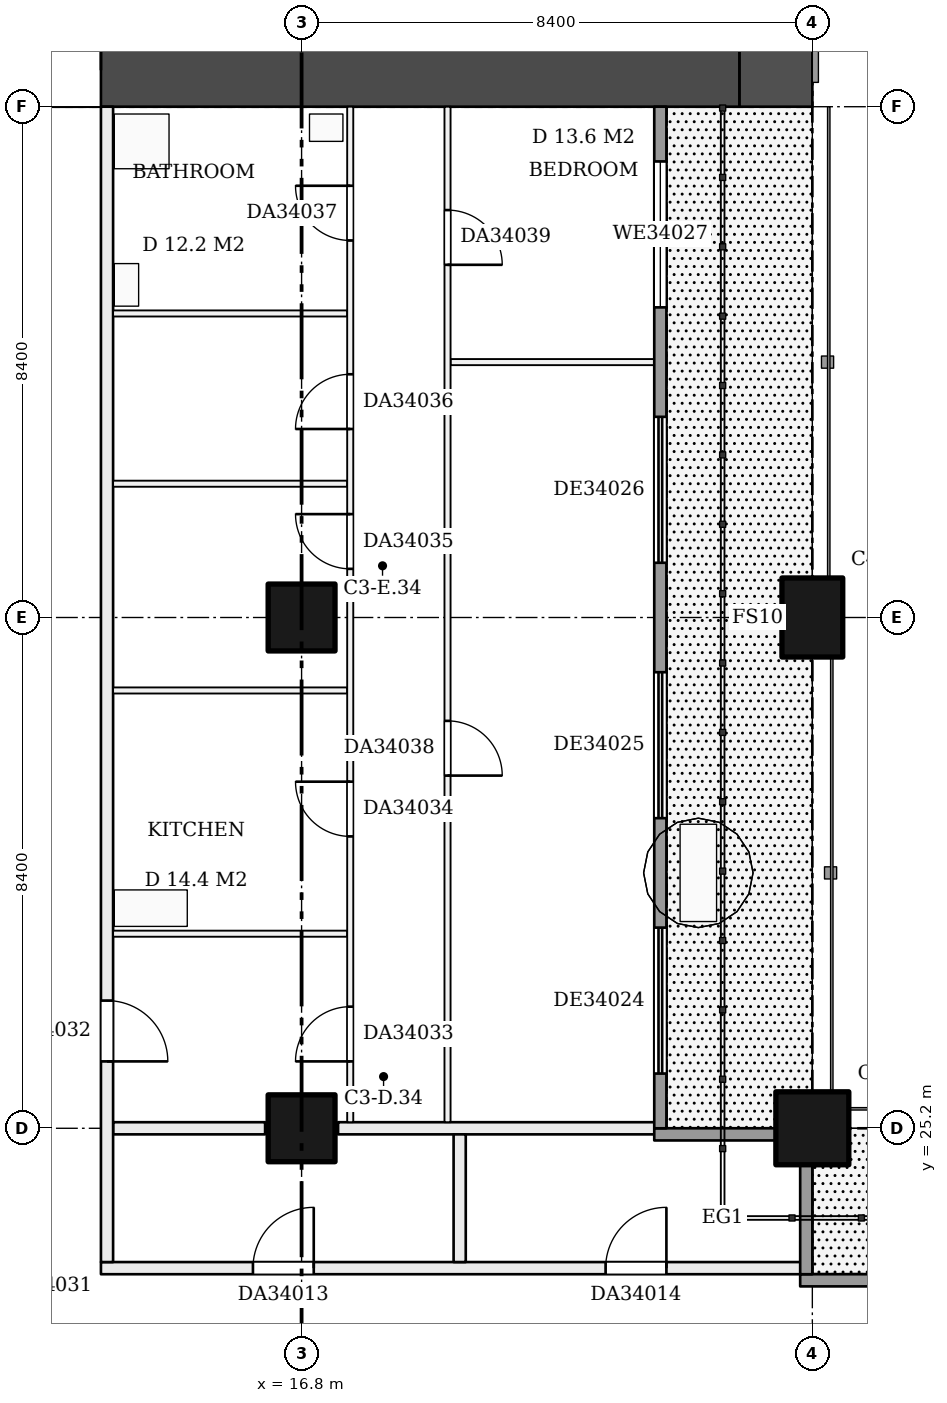
"""IFC4 building model, lengths in metres.
Left out: names, types, materials, properties, quantities, classifications, styles, units other than length and angle.
Written with IfcOpenShell. Run it as: python <this file> out.ifc"""

import sys

from ifc_helpers import new_model, si_unit, direction, frame, frame_2d, origin, origin_2d, place, context, subcontext, project, spatial, rectangle, extrude, element, fill, save


model = new_model("IFC4")
c1 = context("Model", 3, precision=1e-05, world=origin(), true_north=direction((0.0, 1.0)))
c2 = subcontext(c1, "Body", "Model", "MODEL_VIEW")
j1 = project(units=[si_unit("LENGTHUNIT", "METRE"), si_unit("PLANEANGLEUNIT", "RADIAN")], contexts=[c1])
p1 = place(None, origin())
s1 = spatial("IfcSite", under=j1, at=p1, CompositionType="ELEMENT")
p2 = place(p1, origin())
s2 = spatial("IfcBuilding", under=s1, at=p2, CompositionType="ELEMENT")
p3 = place(p2, frame((0.0, 0.0, 133.7)))
s3 = spatial("IfcBuildingStorey", under=s2, at=p3, CompositionType="ELEMENT", Elevation=133.7)
for number, where, z_axis, x_axis in (
    (1, (16.8, 25.2, 0.0), (0.0, 0.0, 1.0), (1.0, 0.0, 0.0)),
    (2, (16.8, 33.6, 0.0), (0.0, 0.0, 1.0), (1.0, 0.0, 0.0)),
):
    element("IfcColumn", number, at=place(p3, frame(where, z_axis=z_axis, x_axis=x_axis)), inside=s3, PredefinedType="COLUMN", context=c2, shape_type="SweptSolid", body=[
        extrude(rectangle(XDim=1.1, YDim=1.1, at=origin_2d()), origin(), (0.0, 0.0, 1.0), 3.22),
    ])
p4 = place(p3, frame((25.2, 25.2, 0.0), z_axis=(0.0, 0.0, 1.0), x_axis=(1.0, 0.0, 0.0)))
e3 = element("IfcColumn", 3, at=p4, inside=s3, PredefinedType="COLUMN", context=c2, shape_type="SweptSolid", body=[
    extrude(rectangle(XDim=1.2, YDim=1.2, at=origin_2d()), origin(), (0.0, 0.0, 1.0), 3.22),
])
p5 = place(p3, frame((25.2, 33.6, 0.0), z_axis=(0.0, 0.0, 1.0), x_axis=(0.0, 1.0, 0.0)))
e4 = element("IfcColumn", 4, at=p5, inside=s3, PredefinedType="COLUMN", context=c2, shape_type="SweptSolid", body=[
    extrude(rectangle(XDim=1.3, YDim=1.0, at=origin_2d()), origin(), (0.0, 0.0, 1.0), 3.22),
])
p6 = place(p3, frame((24.6, 58.8, 0.0), z_axis=(0.0, 0.0, 1.0), x_axis=(0.0, -1.0, 0.0)))
e5 = element("IfcWall", 5, at=p6, inside=s3, PredefinedType="SHEAR", context=c2, shape_type="SweptSolid", body=[
    extrude(rectangle(XDim=16.8, YDim=1.2, at=frame_2d((8.4, 0.0))), origin(), (0.0, 0.0, 1.0), 3.22),
])
p7 = place(p6, frame((1.8, 0.0, 0.5)))
e6 = element("IfcOpeningElement", 6, at=p7, cuts=e5, PredefinedType="OPENING", context=c2, shape_type="SweptSolid", body=[
    extrude(rectangle(XDim=1.8, YDim=2.4, at=frame_2d((0.9, 1.2))), frame((0.0, 0.61, 0.0), z_axis=(0.0, -1.0, 0.0), x_axis=(1.0, 0.0, 0.0)), (0.0, 0.0, 1.0), 1.22),
])
p8 = place(p6, frame((4.644, 0.0, 1.6)))
e7 = element("IfcOpeningElement", 7, at=p8, cuts=e5, PredefinedType="OPENING", context=c2, shape_type="SweptSolid", body=[
    extrude(rectangle(XDim=1.2, YDim=1.2, at=frame_2d((0.6, 0.6))), frame((0.0, 0.61, 0.0), z_axis=(0.0, -1.0, 0.0), x_axis=(1.0, 0.0, 0.0)), (0.0, 0.0, 1.0), 1.22),
])
p9 = place(p6, frame((6.45, 0.0, 1.6)))
e8 = element("IfcOpeningElement", 8, at=p9, cuts=e5, PredefinedType="OPENING", context=c2, shape_type="SweptSolid", body=[
    extrude(rectangle(XDim=1.8, YDim=1.2, at=frame_2d((0.9, 0.6))), frame((0.0, 0.61, 0.0), z_axis=(0.0, -1.0, 0.0), x_axis=(1.0, 0.0, 0.0)), (0.0, 0.0, 1.0), 1.22),
])
p10 = place(p6, frame((12.65, 0.0, 0.6)))
e9 = element("IfcOpeningElement", 9, at=p10, cuts=e5, PredefinedType="OPENING", context=c2, shape_type="SweptSolid", body=[
    extrude(rectangle(XDim=1.0, YDim=2.1, at=frame_2d((0.5, 1.05))), frame((0.0, 0.61, 0.0), z_axis=(0.0, -1.0, 0.0), x_axis=(1.0, 0.0, 0.0)), (0.0, 0.0, 1.0), 1.22),
])
p11 = place(p6, frame((14.175, 0.0, 1.6)))
e10 = element("IfcOpeningElement", 10, at=p11, cuts=e5, PredefinedType="OPENING", context=c2, shape_type="SweptSolid", body=[
    extrude(rectangle(XDim=1.2, YDim=1.2, at=frame_2d((0.6, 0.6))), frame((0.0, 0.61, 0.0), z_axis=(0.0, -1.0, 0.0), x_axis=(1.0, 0.0, 0.0)), (0.0, 0.0, 1.0), 1.22),
])
p12 = place(p3, frame((9.6, 42.6, 0.0), z_axis=(0.0, 0.0, 1.0), x_axis=(1.0, 0.0, 0.0)))
e11 = element("IfcWall", 11, at=p12, inside=s3, PredefinedType="SHEAR", context=c2, shape_type="SweptSolid", body=[
    extrude(rectangle(XDim=14.4, YDim=1.2, at=frame_2d((7.2, 0.0))), origin(), (0.0, 0.0, 1.0), 3.22),
])
p13 = place(p12, frame((2.1, 0.0, 0.0)))
e12 = element("IfcOpeningElement", 12, at=p13, cuts=e11, PredefinedType="OPENING", context=c2, shape_type="SweptSolid", body=[
    extrude(rectangle(XDim=1.8, YDim=2.1, at=frame_2d((0.9, 1.05))), frame((0.0, 0.61, 0.0), z_axis=(0.0, -1.0, 0.0), x_axis=(1.0, 0.0, 0.0)), (0.0, 0.0, 1.0), 1.22),
])
p14 = place(p3, frame((13.5, 22.9, 0.0), z_axis=(0.0, 0.0, 1.0), x_axis=(1.0, 0.0, 0.0)))
e13 = element("IfcWall", 13, at=p14, inside=s3, PredefinedType="PARTITIONING", context=c2, shape_type="SweptSolid", body=[
    extrude(rectangle(XDim=11.6, YDim=0.2, at=frame_2d((5.8, 0.0))), origin(), (0.0, 0.0, 1.0), 3.22),
])
p15 = place(p14, frame((2.5, 0.0, 0.0)))
e14 = element("IfcOpeningElement", 14, at=p15, cuts=e13, PredefinedType="OPENING", context=c2, shape_type="SweptSolid", body=[
    extrude(rectangle(XDim=1.0, YDim=2.1, at=frame_2d((0.5, 1.05))), frame((0.0, 0.11, 0.0), z_axis=(0.0, -1.0, 0.0), x_axis=(1.0, 0.0, 0.0)), (0.0, 0.0, 1.0), 0.22),
])
p16 = place(p14, frame((8.3, 0.0, 0.0)))
e15 = element("IfcOpeningElement", 15, at=p16, cuts=e13, PredefinedType="OPENING", context=c2, shape_type="SweptSolid", body=[
    extrude(rectangle(XDim=1.0, YDim=2.1, at=frame_2d((0.5, 1.05))), frame((0.0, 0.11, 0.0), z_axis=(0.0, -1.0, 0.0), x_axis=(1.0, 0.0, 0.0)), (0.0, 0.0, 1.0), 0.22),
])
p17 = place(p3, frame((13.7, 25.2, 0.0), z_axis=(0.0, 0.0, 1.0), x_axis=(1.0, 0.0, 0.0)))
e16 = element("IfcWall", 16, at=p17, inside=s3, PredefinedType="PARTITIONING", context=c2, shape_type="SweptSolid", body=[
    extrude(rectangle(XDim=2.5, YDim=0.2, at=frame_2d((1.25, 0.0))), origin(), (0.0, 0.0, 1.0), 3.22),
])
p18 = place(p3, frame((17.4, 25.2, 0.0), z_axis=(0.0, 0.0, 1.0), x_axis=(1.0, 0.0, 0.0)))
e17 = element("IfcWall", 17, at=p18, inside=s3, PredefinedType="PARTITIONING", context=c2, shape_type="SweptSolid", body=[
    extrude(rectangle(XDim=5.3, YDim=0.2, at=frame_2d((2.65, 0.0))), origin(), (0.0, 0.0, 1.0), 3.22),
])
for number, where, z_axis, x_axis in (
    (18, (13.7, 28.4, 0.0), (0.0, 0.0, 1.0), (1.0, 0.0, 0.0)),
    (19, (13.7, 32.4, 0.0), (0.0, 0.0, 1.0), (1.0, 0.0, 0.0)),
    (20, (13.7, 35.8, 0.0), (0.0, 0.0, 1.0), (1.0, 0.0, 0.0)),
):
    element("IfcWall", number, at=place(p3, frame(where, z_axis=z_axis, x_axis=x_axis)), inside=s3, PredefinedType="PARTITIONING", context=c2, shape_type="SweptSolid", body=[
        extrude(rectangle(XDim=3.85, YDim=0.1, at=frame_2d((1.925, 0.0))), origin(), (0.0, 0.0, 1.0), 3.22),
    ])
p19 = place(p3, frame((19.25, 37.8, 0.0), z_axis=(0.0, 0.0, 1.0), x_axis=(1.0, 0.0, 0.0)))
e21 = element("IfcWall", 21, at=p19, inside=s3, PredefinedType="PARTITIONING", context=c2, shape_type="SweptSolid", body=[
    extrude(rectangle(XDim=3.45, YDim=0.1, at=frame_2d((1.725, 0.0))), origin(), (0.0, 0.0, 1.0), 3.22),
])
p20 = place(p3, frame((13.7, 38.6, 0.0), z_axis=(0.0, 0.0, 1.0), x_axis=(1.0, 0.0, 0.0)))
e22 = element("IfcWall", 22, at=p20, inside=s3, PredefinedType="PARTITIONING", context=c2, shape_type="SweptSolid", body=[
    extrude(rectangle(XDim=3.85, YDim=0.1, at=frame_2d((1.925, 0.0))), origin(), (0.0, 0.0, 1.0), 3.22),
])
p21 = place(p3, frame((13.6, 23.0, 0.0), z_axis=(0.0, 0.0, 1.0), x_axis=(0.0, 1.0, 0.0)))
e23 = element("IfcWall", 23, at=p21, inside=s3, PredefinedType="PARTITIONING", context=c2, shape_type="SweptSolid", body=[
    extrude(rectangle(XDim=19.0, YDim=0.2, at=frame_2d((9.5, 0.0))), origin(), (0.0, 0.0, 1.0), 3.22),
])
p22 = place(p21, frame((3.3, 0.0, 0.0)))
e24 = element("IfcOpeningElement", 24, at=p22, cuts=e23, PredefinedType="OPENING", context=c2, shape_type="SweptSolid", body=[
    extrude(rectangle(XDim=1.0, YDim=2.1, at=frame_2d((0.5, 1.05))), frame((0.0, 0.11, 0.0), z_axis=(0.0, -1.0, 0.0), x_axis=(1.0, 0.0, 0.0)), (0.0, 0.0, 1.0), 0.22),
])
p23 = place(p3, frame((17.6, 25.3, 0.0), z_axis=(0.0, 0.0, 1.0), x_axis=(0.0, 1.0, 0.0)))
e25 = element("IfcWall", 25, at=p23, inside=s3, PredefinedType="PARTITIONING", context=c2, shape_type="SweptSolid", body=[
    extrude(rectangle(XDim=16.7, YDim=0.1, at=frame_2d((8.35, 0.0))), origin(), (0.0, 0.0, 1.0), 3.22),
])
p24 = place(p23, frame((1.0, 0.0, 0.0)))
e26 = element("IfcOpeningElement", 26, at=p24, cuts=e25, PredefinedType="OPENING", context=c2, shape_type="SweptSolid", body=[
    extrude(rectangle(XDim=0.9, YDim=2.1, at=frame_2d((0.45, 1.05))), frame((0.0, 0.06, 0.0), z_axis=(0.0, -1.0, 0.0), x_axis=(1.0, 0.0, 0.0)), (0.0, 0.0, 1.0), 0.12),
])
p25 = place(p23, frame((4.7, 0.0, 0.0)))
e27 = element("IfcOpeningElement", 27, at=p25, cuts=e25, PredefinedType="OPENING", context=c2, shape_type="SweptSolid", body=[
    extrude(rectangle(XDim=0.9, YDim=2.1, at=frame_2d((0.45, 1.05))), frame((0.0, 0.06, 0.0), z_axis=(0.0, -1.0, 0.0), x_axis=(1.0, 0.0, 0.0)), (0.0, 0.0, 1.0), 0.12),
])
p26 = place(p23, frame((9.1, 0.0, 0.0)))
e28 = element("IfcOpeningElement", 28, at=p26, cuts=e25, PredefinedType="OPENING", context=c2, shape_type="SweptSolid", body=[
    extrude(rectangle(XDim=0.9, YDim=2.1, at=frame_2d((0.45, 1.05))), frame((0.0, 0.06, 0.0), z_axis=(0.0, -1.0, 0.0), x_axis=(1.0, 0.0, 0.0)), (0.0, 0.0, 1.0), 0.12),
])
p27 = place(p23, frame((11.4, 0.0, 0.0)))
e29 = element("IfcOpeningElement", 29, at=p27, cuts=e25, PredefinedType="OPENING", context=c2, shape_type="SweptSolid", body=[
    extrude(rectangle(XDim=0.9, YDim=2.1, at=frame_2d((0.45, 1.05))), frame((0.0, 0.06, 0.0), z_axis=(0.0, -1.0, 0.0), x_axis=(1.0, 0.0, 0.0)), (0.0, 0.0, 1.0), 0.12),
])
p28 = place(p23, frame((14.5, 0.0, 0.0)))
e30 = element("IfcOpeningElement", 30, at=p28, cuts=e25, PredefinedType="OPENING", context=c2, shape_type="SweptSolid", body=[
    extrude(rectangle(XDim=0.9, YDim=2.1, at=frame_2d((0.45, 1.05))), frame((0.0, 0.06, 0.0), z_axis=(0.0, -1.0, 0.0), x_axis=(1.0, 0.0, 0.0)), (0.0, 0.0, 1.0), 0.12),
])
p29 = place(p3, frame((19.2, 25.3, 0.0), z_axis=(0.0, 0.0, 1.0), x_axis=(0.0, 1.0, 0.0)))
e31 = element("IfcWall", 31, at=p29, inside=s3, PredefinedType="PARTITIONING", context=c2, shape_type="SweptSolid", body=[
    extrude(rectangle(XDim=16.7, YDim=0.1, at=frame_2d((8.35, 0.0))), origin(), (0.0, 0.0, 1.0), 3.22),
])
p30 = place(p29, frame((5.7, 0.0, 0.0)))
e32 = element("IfcOpeningElement", 32, at=p30, cuts=e31, PredefinedType="OPENING", context=c2, shape_type="SweptSolid", body=[
    extrude(rectangle(XDim=0.9, YDim=2.1, at=frame_2d((0.45, 1.05))), frame((0.0, 0.06, 0.0), z_axis=(0.0, -1.0, 0.0), x_axis=(1.0, 0.0, 0.0)), (0.0, 0.0, 1.0), 0.12),
])
p31 = place(p29, frame((14.1, 0.0, 0.0)))
e33 = element("IfcOpeningElement", 33, at=p31, cuts=e31, PredefinedType="OPENING", context=c2, shape_type="SweptSolid", body=[
    extrude(rectangle(XDim=0.9, YDim=2.1, at=frame_2d((0.45, 1.05))), frame((0.0, 0.06, 0.0), z_axis=(0.0, -1.0, 0.0), x_axis=(1.0, 0.0, 0.0)), (0.0, 0.0, 1.0), 0.12),
])
p32 = place(p3, frame((19.4, 23.0, 0.0), z_axis=(0.0, 0.0, 1.0), x_axis=(0.0, 1.0, 0.0)))
e34 = element("IfcWall", 34, at=p32, inside=s3, PredefinedType="PARTITIONING", context=c2, shape_type="SweptSolid", body=[
    extrude(rectangle(XDim=2.1, YDim=0.2, at=frame_2d((1.05, 0.0))), origin(), (0.0, 0.0, 1.0), 3.22),
])
p33 = place(p3, frame((42.0, 22.7, 0.0), z_axis=(0.0, 0.0, 1.0), x_axis=(-1.0, 0.0, 0.0)))
e35 = element("IfcWall", 35, at=p33, inside=s3, PredefinedType="SOLIDWALL", context=c2, shape_type="SweptSolid", body=[
    extrude(rectangle(XDim=17.0, YDim=0.2, at=frame_2d((8.5, 0.0))), origin(), (0.0, 0.0, 1.0), 3.22),
])
p34 = place(p33, frame((9.6, 0.0, 0.0)))
e36 = element("IfcOpeningElement", 36, at=p34, cuts=e35, PredefinedType="OPENING", context=c2, shape_type="SweptSolid", body=[
    extrude(rectangle(XDim=1.8, YDim=2.4, at=frame_2d((0.9, 1.2))), frame((0.0, 0.11, 0.0), z_axis=(0.0, -1.0, 0.0), x_axis=(1.0, 0.0, 0.0)), (0.0, 0.0, 1.0), 0.22),
])
p35 = place(p3, frame((25.1, 22.8, 0.0), z_axis=(0.0, 0.0, 1.0), x_axis=(0.0, 1.0, 0.0)))
e37 = element("IfcWall", 37, at=p35, inside=s3, PredefinedType="SOLIDWALL", context=c2, shape_type="SweptSolid", body=[
    extrude(rectangle(XDim=1.8, YDim=0.2, at=frame_2d((0.9, 0.0))), origin(), (0.0, 0.0, 1.0), 3.22),
])
p36 = place(p3, frame((24.6, 25.1, 0.0), z_axis=(0.0, 0.0, 1.0), x_axis=(-1.0, 0.0, 0.0)))
e38 = element("IfcWall", 38, at=p36, inside=s3, PredefinedType="SOLIDWALL", context=c2, shape_type="SweptSolid", body=[
    extrude(rectangle(XDim=2.0, YDim=0.2, at=frame_2d((1.0, 0.0))), origin(), (0.0, 0.0, 1.0), 3.22),
])
p37 = place(p3, frame((22.7, 25.2, 0.0), z_axis=(0.0, 0.0, 1.0), x_axis=(0.0, 1.0, 0.0)))
e39 = element("IfcWall", 39, at=p37, inside=s3, PredefinedType="SOLIDWALL", context=c2, shape_type="SweptSolid", body=[
    extrude(rectangle(XDim=16.8, YDim=0.2, at=frame_2d((8.4, 0.0))), origin(), (0.0, 0.0, 1.0), 3.22),
])
p38 = place(p37, frame((0.9, 0.0, 0.0)))
e40 = element("IfcOpeningElement", 40, at=p38, cuts=e39, PredefinedType="OPENING", context=c2, shape_type="SweptSolid", body=[
    extrude(rectangle(XDim=2.4, YDim=2.2, at=frame_2d((1.2, 1.1))), frame((0.0, 0.11, 0.0), z_axis=(0.0, -1.0, 0.0), x_axis=(1.0, 0.0, 0.0)), (0.0, 0.0, 1.0), 0.22),
])
p39 = place(p37, frame((5.1, 0.0, 0.0)))
e41 = element("IfcOpeningElement", 41, at=p39, cuts=e39, PredefinedType="OPENING", context=c2, shape_type="SweptSolid", body=[
    extrude(rectangle(XDim=2.4, YDim=2.2, at=frame_2d((1.2, 1.1))), frame((0.0, 0.11, 0.0), z_axis=(0.0, -1.0, 0.0), x_axis=(1.0, 0.0, 0.0)), (0.0, 0.0, 1.0), 0.22),
])
p40 = place(p37, frame((9.3, 0.0, 0.0)))
e42 = element("IfcOpeningElement", 42, at=p40, cuts=e39, PredefinedType="OPENING", context=c2, shape_type="SweptSolid", body=[
    extrude(rectangle(XDim=2.4, YDim=2.2, at=frame_2d((1.2, 1.1))), frame((0.0, 0.11, 0.0), z_axis=(0.0, -1.0, 0.0), x_axis=(1.0, 0.0, 0.0)), (0.0, 0.0, 1.0), 0.22),
])
p41 = place(p37, frame((13.5, 0.0, 0.9)))
e43 = element("IfcOpeningElement", 43, at=p41, cuts=e39, PredefinedType="OPENING", context=c2, shape_type="SweptSolid", body=[
    extrude(rectangle(XDim=2.4, YDim=1.5, at=frame_2d((1.2, 0.75))), frame((0.0, 0.11, 0.0), z_axis=(0.0, -1.0, 0.0), x_axis=(1.0, 0.0, 0.0)), (0.0, 0.0, 1.0), 0.22),
])
p42 = place(p13, origin())
e44 = element("IfcDoor", 44, at=p42, inside=s3, OperationType="DOUBLE_DOOR_SINGLE_SWING", PredefinedType="DOOR", context=c2, shape_type="SweptSolid", body=[
    extrude(rectangle(XDim=1.8, YDim=2.1, at=frame_2d((0.9, 1.05))), frame((0.0, 0.025, 0.0), z_axis=(0.0, -1.0, 0.0), x_axis=(1.0, 0.0, 0.0)), (0.0, 0.0, 1.0), 0.05),
])
fill(e12, e44)
p43 = place(p15, origin())
e45 = element("IfcDoor", 45, at=p43, inside=s3, OperationType="SINGLE_SWING_RIGHT", PredefinedType="DOOR", context=c2, shape_type="SweptSolid", body=[
    extrude(rectangle(XDim=1.0, YDim=2.1, at=frame_2d((0.5, 1.05))), frame((0.0, 0.025, 0.0), z_axis=(0.0, -1.0, 0.0), x_axis=(1.0, 0.0, 0.0)), (0.0, 0.0, 1.0), 0.05),
])
fill(e14, e45)
p44 = place(p16, origin())
e46 = element("IfcDoor", 46, at=p44, inside=s3, OperationType="SINGLE_SWING_RIGHT", PredefinedType="DOOR", context=c2, shape_type="SweptSolid", body=[
    extrude(rectangle(XDim=1.0, YDim=2.1, at=frame_2d((0.5, 1.05))), frame((0.0, 0.025, 0.0), z_axis=(0.0, -1.0, 0.0), x_axis=(1.0, 0.0, 0.0)), (0.0, 0.0, 1.0), 0.05),
])
fill(e15, e46)
p45 = place(p22, frame((1.0, 0.0, 0.0), z_axis=(0.0, 0.0, 1.0), x_axis=(-1.0, 0.0, 0.0)))
e47 = element("IfcDoor", 47, at=p45, inside=s3, OperationType="SINGLE_SWING_RIGHT", PredefinedType="DOOR", context=c2, shape_type="SweptSolid", body=[
    extrude(rectangle(XDim=1.0, YDim=2.1, at=frame_2d((0.5, 1.05))), frame((0.0, 0.025, 0.0), z_axis=(0.0, -1.0, 0.0), x_axis=(1.0, 0.0, 0.0)), (0.0, 0.0, 1.0), 0.05),
])
fill(e24, e47)
p46 = place(p24, origin())
e48 = element("IfcDoor", 48, at=p46, inside=s3, OperationType="SINGLE_SWING_LEFT", PredefinedType="DOOR", context=c2, shape_type="SweptSolid", body=[
    extrude(rectangle(XDim=0.9, YDim=2.1, at=frame_2d((0.45, 1.05))), frame((0.0, 0.025, 0.0), z_axis=(0.0, -1.0, 0.0), x_axis=(1.0, 0.0, 0.0)), (0.0, 0.0, 1.0), 0.05),
])
fill(e26, e48)
p47 = place(p25, origin())
e49 = element("IfcDoor", 49, at=p47, inside=s3, OperationType="SINGLE_SWING_RIGHT", PredefinedType="DOOR", context=c2, shape_type="SweptSolid", body=[
    extrude(rectangle(XDim=0.9, YDim=2.1, at=frame_2d((0.45, 1.05))), frame((0.0, 0.025, 0.0), z_axis=(0.0, -1.0, 0.0), x_axis=(1.0, 0.0, 0.0)), (0.0, 0.0, 1.0), 0.05),
])
fill(e27, e49)
p48 = place(p26, origin())
e50 = element("IfcDoor", 50, at=p48, inside=s3, OperationType="SINGLE_SWING_RIGHT", PredefinedType="DOOR", context=c2, shape_type="SweptSolid", body=[
    extrude(rectangle(XDim=0.9, YDim=2.1, at=frame_2d((0.45, 1.05))), frame((0.0, 0.025, 0.0), z_axis=(0.0, -1.0, 0.0), x_axis=(1.0, 0.0, 0.0)), (0.0, 0.0, 1.0), 0.05),
])
fill(e28, e50)
p49 = place(p27, origin())
e51 = element("IfcDoor", 51, at=p49, inside=s3, OperationType="SINGLE_SWING_LEFT", PredefinedType="DOOR", context=c2, shape_type="SweptSolid", body=[
    extrude(rectangle(XDim=0.9, YDim=2.1, at=frame_2d((0.45, 1.05))), frame((0.0, 0.025, 0.0), z_axis=(0.0, -1.0, 0.0), x_axis=(1.0, 0.0, 0.0)), (0.0, 0.0, 1.0), 0.05),
])
fill(e29, e51)
p50 = place(p28, origin())
e52 = element("IfcDoor", 52, at=p50, inside=s3, OperationType="SINGLE_SWING_RIGHT", PredefinedType="DOOR", context=c2, shape_type="SweptSolid", body=[
    extrude(rectangle(XDim=0.9, YDim=2.1, at=frame_2d((0.45, 1.05))), frame((0.0, 0.025, 0.0), z_axis=(0.0, -1.0, 0.0), x_axis=(1.0, 0.0, 0.0)), (0.0, 0.0, 1.0), 0.05),
])
fill(e30, e52)
p51 = place(p30, frame((0.9, 0.0, 0.0), z_axis=(0.0, 0.0, 1.0), x_axis=(-1.0, 0.0, 0.0)))
e53 = element("IfcDoor", 53, at=p51, inside=s3, OperationType="SINGLE_SWING_RIGHT", PredefinedType="DOOR", context=c2, shape_type="SweptSolid", body=[
    extrude(rectangle(XDim=0.9, YDim=2.1, at=frame_2d((0.45, 1.05))), frame((0.0, 0.025, 0.0), z_axis=(0.0, -1.0, 0.0), x_axis=(1.0, 0.0, 0.0)), (0.0, 0.0, 1.0), 0.05),
])
fill(e32, e53)
p52 = place(p31, frame((0.9, 0.0, 0.0), z_axis=(0.0, 0.0, 1.0), x_axis=(-1.0, 0.0, 0.0)))
e54 = element("IfcDoor", 54, at=p52, inside=s3, OperationType="SINGLE_SWING_RIGHT", PredefinedType="DOOR", context=c2, shape_type="SweptSolid", body=[
    extrude(rectangle(XDim=0.9, YDim=2.1, at=frame_2d((0.45, 1.05))), frame((0.0, 0.025, 0.0), z_axis=(0.0, -1.0, 0.0), x_axis=(1.0, 0.0, 0.0)), (0.0, 0.0, 1.0), 0.05),
])
fill(e33, e54)
p53 = place(p38, origin())
e55 = element("IfcDoor", 55, at=p53, inside=s3, OperationType="DOUBLE_DOOR_SLIDING", PredefinedType="DOOR", context=c2, shape_type="SweptSolid", body=[
    extrude(rectangle(XDim=2.4, YDim=2.2, at=frame_2d((1.2, 1.1))), frame((0.0, 0.025, 0.0), z_axis=(0.0, -1.0, 0.0), x_axis=(1.0, 0.0, 0.0)), (0.0, 0.0, 1.0), 0.05),
])
fill(e40, e55)
p54 = place(p39, origin())
e56 = element("IfcDoor", 56, at=p54, inside=s3, OperationType="DOUBLE_DOOR_SLIDING", PredefinedType="DOOR", context=c2, shape_type="SweptSolid", body=[
    extrude(rectangle(XDim=2.4, YDim=2.2, at=frame_2d((1.2, 1.1))), frame((0.0, 0.025, 0.0), z_axis=(0.0, -1.0, 0.0), x_axis=(1.0, 0.0, 0.0)), (0.0, 0.0, 1.0), 0.05),
])
fill(e41, e56)
p55 = place(p40, origin())
e57 = element("IfcDoor", 57, at=p55, inside=s3, OperationType="DOUBLE_DOOR_SLIDING", PredefinedType="DOOR", context=c2, shape_type="SweptSolid", body=[
    extrude(rectangle(XDim=2.4, YDim=2.2, at=frame_2d((1.2, 1.1))), frame((0.0, 0.025, 0.0), z_axis=(0.0, -1.0, 0.0), x_axis=(1.0, 0.0, 0.0)), (0.0, 0.0, 1.0), 0.05),
])
fill(e42, e57)
p56 = place(p41, origin())
e58 = element("IfcWindow", 58, at=p56, inside=s3, PartitioningType="SINGLE_PANEL", PredefinedType="WINDOW", context=c2, shape_type="SweptSolid", body=[
    extrude(rectangle(XDim=2.4, YDim=1.5, at=frame_2d((1.2, 0.75))), frame((0.0, 0.03, 0.0), z_axis=(0.0, -1.0, 0.0), x_axis=(1.0, 0.0, 0.0)), (0.0, 0.0, 1.0), 0.06),
])
fill(e43, e58)
save(model, sys.argv[1])
